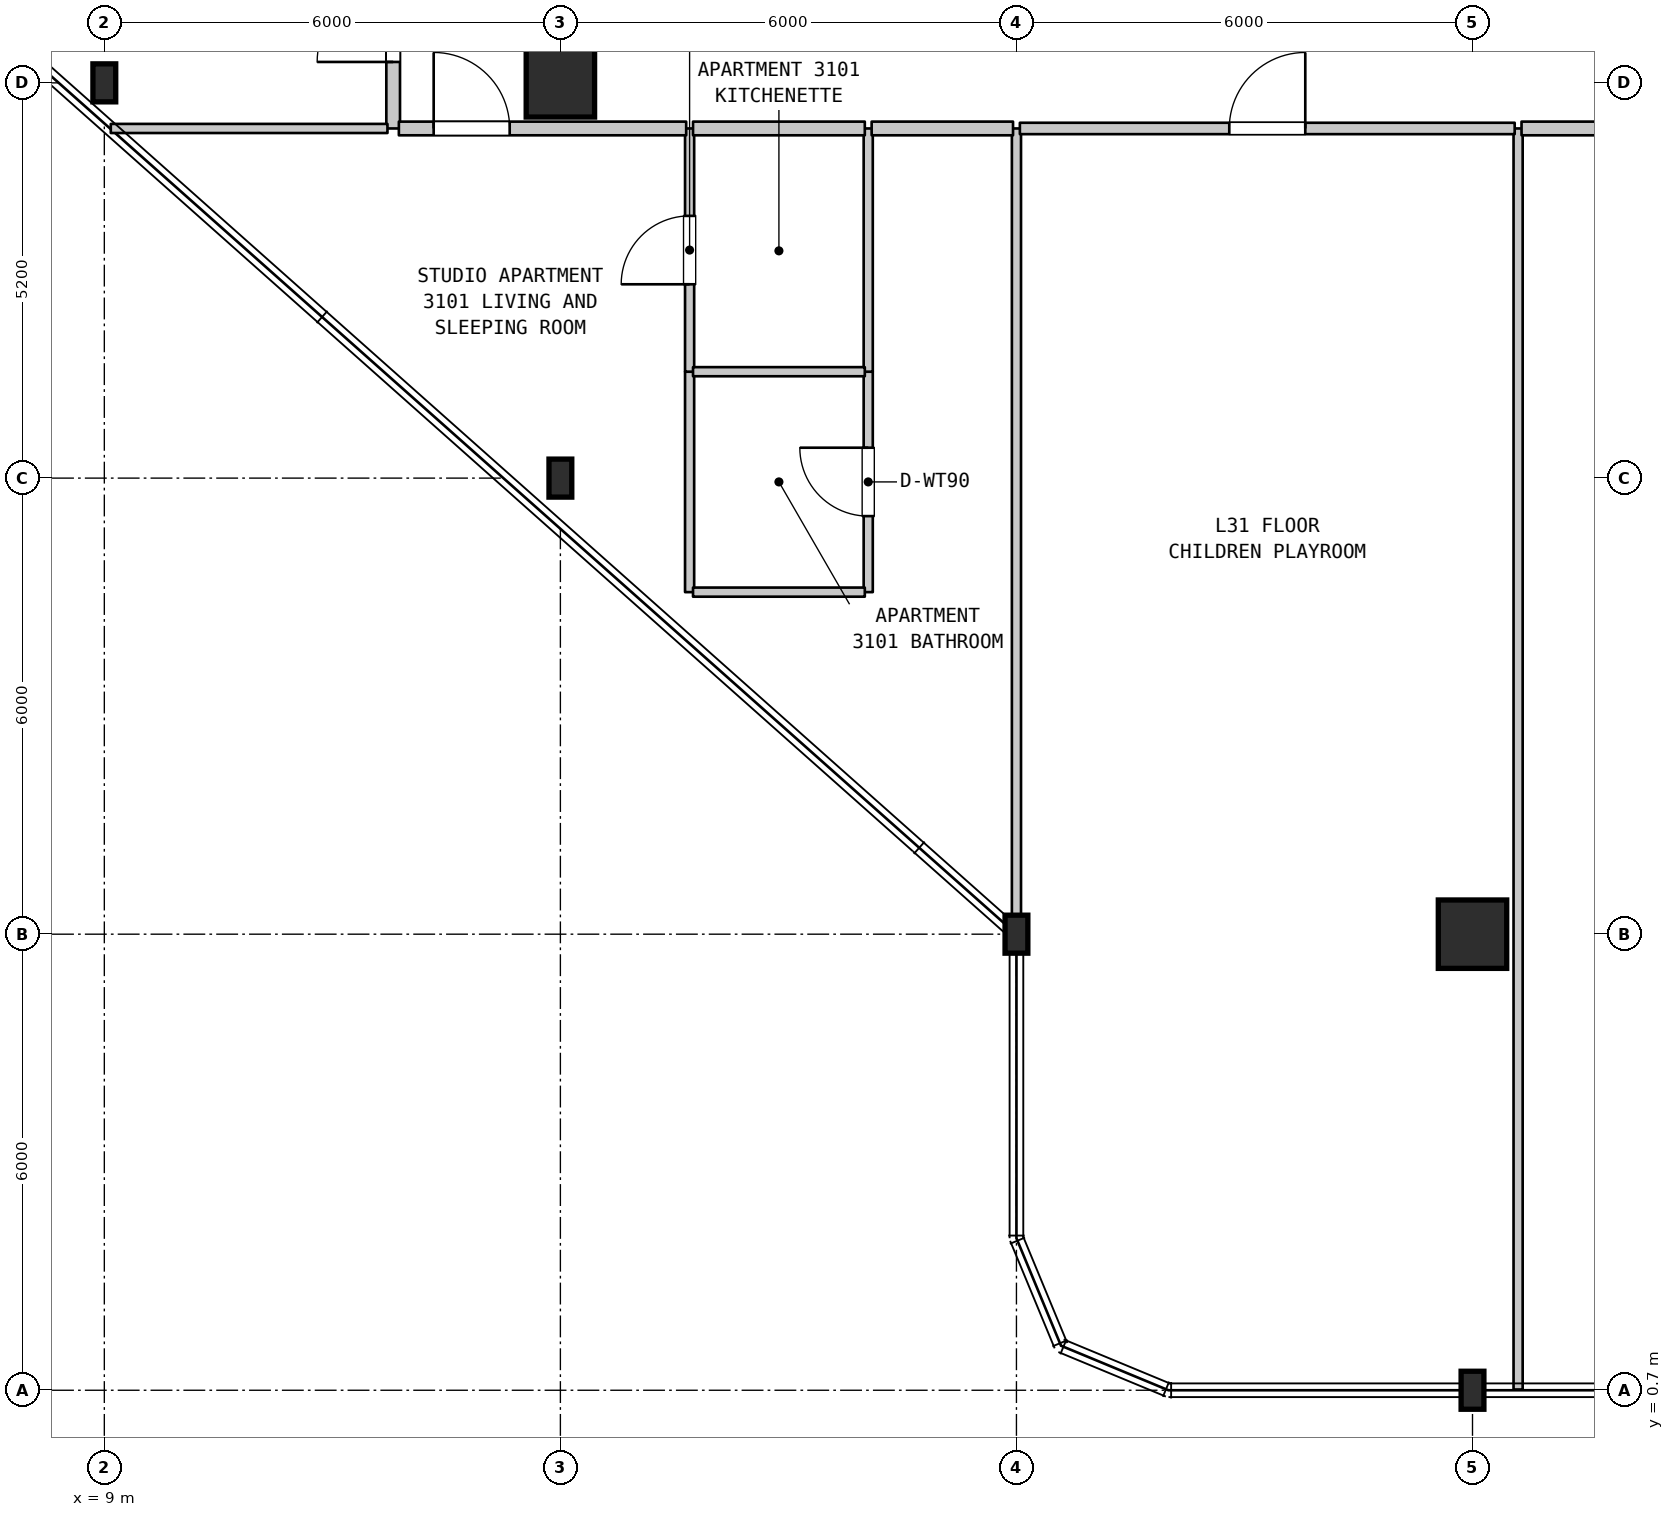
"""IFC4 building model, lengths in metres.
Left out: names, types, materials, properties, quantities, classifications, styles, units other than length and angle.
Written with IfcOpenShell. Run it as: python <this file> out.ifc"""

import sys

from ifc_helpers import new_model, si_unit, direction, frame, frame_2d, origin, origin_2d, place, context, subcontext, project, spatial, rectangle, i_section, extrude, element, fill, save


model = new_model("IFC4")
c1 = context("Model", 3, precision=1e-05, world=origin(), true_north=direction((0.0, 1.0)))
c2 = subcontext(c1, "Body", "Model", "MODEL_VIEW")
j1 = project(units=[si_unit("LENGTHUNIT", "METRE"), si_unit("PLANEANGLEUNIT", "RADIAN")], contexts=[c1])
p1 = place(None, origin())
s1 = spatial("IfcSite", under=j1, at=p1, CompositionType="ELEMENT")
p2 = place(p1, origin())
s2 = spatial("IfcBuilding", under=s1, at=p2, CompositionType="ELEMENT")
p3 = place(p2, frame((0.0, 0.0, 129.8)))
s3 = spatial("IfcBuildingStorey", under=s2, at=p3, CompositionType="ELEMENT", Elevation=129.8)
for number, where, z_axis, x_axis in (
    (1, (9.0, 17.9, 0.0), (0.0, 0.0, 1.0), (1.0, 0.0, 0.0)),
    (2, (15.0, 12.7, 0.0), (0.0, 0.0, 1.0), (1.0, 0.0, 0.0)),
):
    element("IfcColumn", number, at=place(p3, frame(where, z_axis=z_axis, x_axis=x_axis)), inside=s3, PredefinedType="COLUMN", context=c2, shape_type="SweptSolid", body=[
        extrude(i_section(OverallWidth=0.3, OverallDepth=0.5, WebThickness=0.014, FlangeThickness=0.028, FilletRadius=0.027, at=origin_2d()), origin(), (0.0, 0.0, 1.0), 3.7),
    ])
p4 = place(p3, frame((15.0, 17.9, 0.0), z_axis=(0.0, 0.0, 1.0), x_axis=(1.0, 0.0, 0.0)))
e3 = element("IfcColumn", 3, at=p4, inside=s3, PredefinedType="COLUMN", context=c2, shape_type="SweptSolid", body=[
    extrude(rectangle(XDim=0.9, YDim=0.9, at=origin_2d()), origin(), (0.0, 0.0, 1.0), 3.7),
])
for number, where, z_axis, x_axis in (
    (4, (21.0, 6.7, 0.0), (0.0, 0.0, 1.0), (1.0, 0.0, 0.0)),
    (5, (27.0, 0.7, 0.0), (0.0, 0.0, 1.0), (1.0, 0.0, 0.0)),
):
    element("IfcColumn", number, at=place(p3, frame(where, z_axis=z_axis, x_axis=x_axis)), inside=s3, PredefinedType="COLUMN", context=c2, shape_type="SweptSolid", body=[
        extrude(i_section(OverallWidth=0.3, OverallDepth=0.5, WebThickness=0.014, FlangeThickness=0.028, FilletRadius=0.027, at=origin_2d()), origin(), (0.0, 0.0, 1.0), 3.7),
    ])
p5 = place(p3, frame((27.0, 6.7, 0.0), z_axis=(0.0, 0.0, 1.0), x_axis=(1.0, 0.0, 0.0)))
e6 = element("IfcColumn", 6, at=p5, inside=s3, PredefinedType="COLUMN", context=c2, shape_type="SweptSolid", body=[
    extrude(rectangle(XDim=0.9, YDim=0.9, at=origin_2d()), origin(), (0.0, 0.0, 1.0), 3.7),
])
p6 = place(p3, frame((12.8, 17.3, 0.0), z_axis=(0.0, 0.0, 1.0), x_axis=(0.0, 1.0, 0.0)))
e7 = element("IfcWall", 7, at=p6, inside=s3, PredefinedType="STANDARD", context=c2, shape_type="SweptSolid", body=[
    extrude(rectangle(XDim=2.75, YDim=0.18, at=frame_2d((1.375, 0.0))), origin(), (0.0, 0.0, 1.0), 3.385),
])
p7 = place(p6, frame((0.875, 0.0, 0.0)))
e8 = element("IfcOpeningElement", 8, at=p7, cuts=e7, PredefinedType="OPENING", context=c2, shape_type="SweptSolid", body=[
    extrude(rectangle(XDim=1.0, YDim=2.15, at=frame_2d((0.5, 1.075))), frame((0.0, 0.1, 0.0), z_axis=(0.0, -1.0, 0.0), x_axis=(1.0, 0.0, 0.0)), (0.0, 0.0, 1.0), 0.2),
])
p8 = place(p3, frame((16.7, 11.2, 0.0), z_axis=(0.0, 0.0, 1.0), x_axis=(0.0, 1.0, 0.0)))
e9 = element("IfcWall", 9, at=p8, inside=s3, PredefinedType="PARTITIONING", context=c2, shape_type="SweptSolid", body=[
    extrude(rectangle(XDim=2.9, YDim=0.12, at=frame_2d((1.45, 0.0))), origin(), (0.0, 0.0, 1.0), 3.385),
])
p9 = place(p3, frame((16.7, 14.1, 0.0), z_axis=(0.0, 0.0, 1.0), x_axis=(0.0, 1.0, 0.0)))
e10 = element("IfcWall", 10, at=p9, inside=s3, PredefinedType="PARTITIONING", context=c2, shape_type="SweptSolid", body=[
    extrude(rectangle(XDim=3.2, YDim=0.12, at=frame_2d((1.6, 0.0))), origin(), (0.0, 0.0, 1.0), 3.385),
])
p10 = place(p9, frame((1.15, 0.0, 0.0)))
e11 = element("IfcOpeningElement", 11, at=p10, cuts=e10, PredefinedType="OPENING", context=c2, shape_type="SweptSolid", body=[
    extrude(rectangle(XDim=0.9, YDim=2.15, at=frame_2d((0.45, 1.075))), frame((0.0, 0.07, 0.0), z_axis=(0.0, -1.0, 0.0), x_axis=(1.0, 0.0, 0.0)), (0.0, 0.0, 1.0), 0.14),
])
p11 = place(p3, frame((19.05, 11.2, 0.0), z_axis=(0.0, 0.0, 1.0), x_axis=(0.0, 1.0, 0.0)))
e12 = element("IfcWall", 12, at=p11, inside=s3, PredefinedType="PARTITIONING", context=c2, shape_type="SweptSolid", body=[
    extrude(rectangle(XDim=2.9, YDim=0.12, at=frame_2d((1.45, 0.0))), origin(), (0.0, 0.0, 1.0), 3.385),
])
p12 = place(p11, frame((1.0, 0.0, 0.0)))
e13 = element("IfcOpeningElement", 13, at=p12, cuts=e12, PredefinedType="OPENING", context=c2, shape_type="SweptSolid", body=[
    extrude(rectangle(XDim=0.9, YDim=2.1, at=frame_2d((0.45, 1.05))), frame((0.0, 0.07, 0.0), z_axis=(0.0, -1.0, 0.0), x_axis=(1.0, 0.0, 0.0)), (0.0, 0.0, 1.0), 0.14),
])
p13 = place(p3, frame((19.05, 14.1, 0.0), z_axis=(0.0, 0.0, 1.0), x_axis=(0.0, 1.0, 0.0)))
e14 = element("IfcWall", 14, at=p13, inside=s3, PredefinedType="PARTITIONING", context=c2, shape_type="SweptSolid", body=[
    extrude(rectangle(XDim=3.2, YDim=0.12, at=frame_2d((1.6, 0.0))), origin(), (0.0, 0.0, 1.0), 3.385),
])
p14 = place(p3, frame((21.0, 6.71, 0.0), z_axis=(0.0, 0.0, 1.0), x_axis=(0.0, 1.0, 0.0)))
e15 = element("IfcWall", 15, at=p14, inside=s3, PredefinedType="PARTITIONING", context=c2, shape_type="SweptSolid", body=[
    extrude(rectangle(XDim=10.59, YDim=0.12, at=frame_2d((5.295, 0.0))), origin(), (0.0, 0.0, 1.0), 3.385),
])
p15 = place(p3, frame((27.6, 0.71, 0.0), z_axis=(0.0, 0.0, 1.0), x_axis=(0.0, 1.0, 0.0)))
e16 = element("IfcWall", 16, at=p15, inside=s3, PredefinedType="PARTITIONING", context=c2, shape_type="SweptSolid", body=[
    extrude(rectangle(XDim=16.59, YDim=0.12, at=frame_2d((8.295, 0.0))), origin(), (0.0, 0.0, 1.0), 3.385),
])
for number, where, z_axis, x_axis in (
    (17, (16.745, 11.2, 0.0), (0.0, 0.0, 1.0), (1.0, 0.0, 0.0)),
    (18, (16.745, 14.1, 0.0), (0.0, 0.0, 1.0), (1.0, 0.0, 0.0)),
):
    element("IfcWall", number, at=place(p3, frame(where, z_axis=z_axis, x_axis=x_axis)), inside=s3, PredefinedType="PARTITIONING", context=c2, shape_type="SweptSolid", body=[
        extrude(rectangle(XDim=2.26, YDim=0.12, at=frame_2d((1.13, 0.0))), origin(), (0.0, 0.0, 1.0), 3.385),
    ])
p16 = place(p3, frame((9.085, 17.3, 0.0), z_axis=(0.0, 0.0, 1.0), x_axis=(1.0, 0.0, 0.0)))
e19 = element("IfcWall", 19, at=p16, inside=s3, PredefinedType="PARTITIONING", context=c2, shape_type="SweptSolid", body=[
    extrude(rectangle(XDim=3.64, YDim=0.12, at=frame_2d((1.82, 0.0))), origin(), (0.0, 0.0, 1.0), 3.385),
])
p17 = place(p3, frame((12.875, 17.3, 0.0), z_axis=(0.0, 0.0, 1.0), x_axis=(1.0, 0.0, 0.0)))
e20 = element("IfcWall", 20, at=p17, inside=s3, PredefinedType="STANDARD", context=c2, shape_type="SweptSolid", body=[
    extrude(rectangle(XDim=3.78, YDim=0.18, at=frame_2d((1.89, 0.0))), origin(), (0.0, 0.0, 1.0), 3.385),
])
p18 = place(p17, frame((0.458, 0.0, 0.0)))
e21 = element("IfcOpeningElement", 21, at=p18, cuts=e20, PredefinedType="OPENING", context=c2, shape_type="SweptSolid", body=[
    extrude(rectangle(XDim=1.0, YDim=2.15, at=frame_2d((0.5, 1.075))), frame((0.0, 0.1, 0.0), z_axis=(0.0, -1.0, 0.0), x_axis=(1.0, 0.0, 0.0)), (0.0, 0.0, 1.0), 0.2),
])
p19 = place(p3, frame((16.745, 17.3, 0.0), z_axis=(0.0, 0.0, 1.0), x_axis=(1.0, 0.0, 0.0)))
e22 = element("IfcWall", 22, at=p19, inside=s3, PredefinedType="STANDARD", context=c2, shape_type="SweptSolid", body=[
    extrude(rectangle(XDim=2.26, YDim=0.18, at=frame_2d((1.13, 0.0))), origin(), (0.0, 0.0, 1.0), 3.385),
])
p20 = place(p3, frame((19.095, 17.3, 0.0), z_axis=(0.0, 0.0, 1.0), x_axis=(1.0, 0.0, 0.0)))
e23 = element("IfcWall", 23, at=p20, inside=s3, PredefinedType="STANDARD", context=c2, shape_type="SweptSolid", body=[
    extrude(rectangle(XDim=1.86, YDim=0.18, at=frame_2d((0.93, 0.0))), origin(), (0.0, 0.0, 1.0), 3.385),
])
p21 = place(p3, frame((21.045, 17.3, 0.0), z_axis=(0.0, 0.0, 1.0), x_axis=(1.0, 0.0, 0.0)))
e24 = element("IfcWall", 24, at=p21, inside=s3, PredefinedType="STANDARD", context=c2, shape_type="SweptSolid", body=[
    extrude(rectangle(XDim=6.51, YDim=0.15, at=frame_2d((3.255, 0.0))), origin(), (0.0, 0.0, 1.0), 3.385),
])
p22 = place(p21, frame((2.755, 0.0, 0.0)))
e25 = element("IfcOpeningElement", 25, at=p22, cuts=e24, PredefinedType="OPENING", context=c2, shape_type="SweptSolid", body=[
    extrude(rectangle(XDim=1.0, YDim=2.15, at=frame_2d((0.5, 1.075))), frame((0.0, 0.085, 0.0), z_axis=(0.0, -1.0, 0.0), x_axis=(1.0, 0.0, 0.0)), (0.0, 0.0, 1.0), 0.17),
])
p23 = place(p3, frame((27.645, 17.3, 0.0), z_axis=(0.0, 0.0, 1.0), x_axis=(1.0, 0.0, 0.0)))
e26 = element("IfcWall", 26, at=p23, inside=s3, PredefinedType="STANDARD", context=c2, shape_type="SweptSolid", body=[
    extrude(rectangle(XDim=4.45, YDim=0.18, at=frame_2d((2.225, 0.0))), origin(), (0.0, 0.0, 1.0), 3.385),
])
p24 = place(p23, frame((1.653, 0.0, 0.0)))
e27 = element("IfcOpeningElement", 27, at=p24, cuts=e26, PredefinedType="OPENING", context=c2, shape_type="SweptSolid", body=[
    extrude(rectangle(XDim=1.0, YDim=2.15, at=frame_2d((0.5, 1.075))), frame((0.0, 0.1, 0.0), z_axis=(0.0, -1.0, 0.0), x_axis=(1.0, 0.0, 0.0)), (0.0, 0.0, 1.0), 0.2),
])
p25 = place(p7, origin())
e28 = element("IfcDoor", 28, at=p25, inside=s3, OperationType="SINGLE_SWING_LEFT", PredefinedType="DOOR", context=c2, shape_type="SweptSolid", body=[
    extrude(rectangle(XDim=1.0, YDim=2.15, at=frame_2d((0.5, 1.075))), frame((0.0, 0.025, 0.0), z_axis=(0.0, -1.0, 0.0), x_axis=(1.0, 0.0, 0.0)), (0.0, 0.0, 1.0), 0.05),
])
fill(e8, e28)
p26 = place(p10, origin())
e29 = element("IfcDoor", 29, at=p26, inside=s3, OperationType="SINGLE_SWING_LEFT", PredefinedType="DOOR", context=c2, shape_type="SweptSolid", body=[
    extrude(rectangle(XDim=0.9, YDim=2.15, at=frame_2d((0.45, 1.075))), frame((0.0, 0.025, 0.0), z_axis=(0.0, -1.0, 0.0), x_axis=(1.0, 0.0, 0.0)), (0.0, 0.0, 1.0), 0.05),
])
fill(e11, e29)
p27 = place(p12, origin())
e30 = element("IfcDoor", 30, at=p27, inside=s3, OperationType="SINGLE_SWING_RIGHT", PredefinedType="DOOR", context=c2, shape_type="SweptSolid", body=[
    extrude(rectangle(XDim=0.9, YDim=2.1, at=frame_2d((0.45, 1.05))), frame((0.0, 0.025, 0.0), z_axis=(0.0, -1.0, 0.0), x_axis=(1.0, 0.0, 0.0)), (0.0, 0.0, 1.0), 0.05),
])
fill(e13, e30)
p28 = place(p18, origin())
e31 = element("IfcDoor", 31, at=p28, inside=s3, OperationType="SINGLE_SWING_LEFT", PredefinedType="DOOR", context=c2, shape_type="SweptSolid", body=[
    extrude(rectangle(XDim=1.0, YDim=2.15, at=frame_2d((0.5, 1.075))), frame((0.0, 0.025, 0.0), z_axis=(0.0, -1.0, 0.0), x_axis=(1.0, 0.0, 0.0)), (0.0, 0.0, 1.0), 0.05),
])
fill(e21, e31)
p29 = place(p22, origin())
e32 = element("IfcDoor", 32, at=p29, inside=s3, OperationType="SINGLE_SWING_RIGHT", PredefinedType="DOOR", context=c2, shape_type="SweptSolid", body=[
    extrude(rectangle(XDim=1.0, YDim=2.15, at=frame_2d((0.5, 1.075))), frame((0.0, 0.025, 0.0), z_axis=(0.0, -1.0, 0.0), x_axis=(1.0, 0.0, 0.0)), (0.0, 0.0, 1.0), 0.05),
])
fill(e25, e32)
save(model, sys.argv[1])
